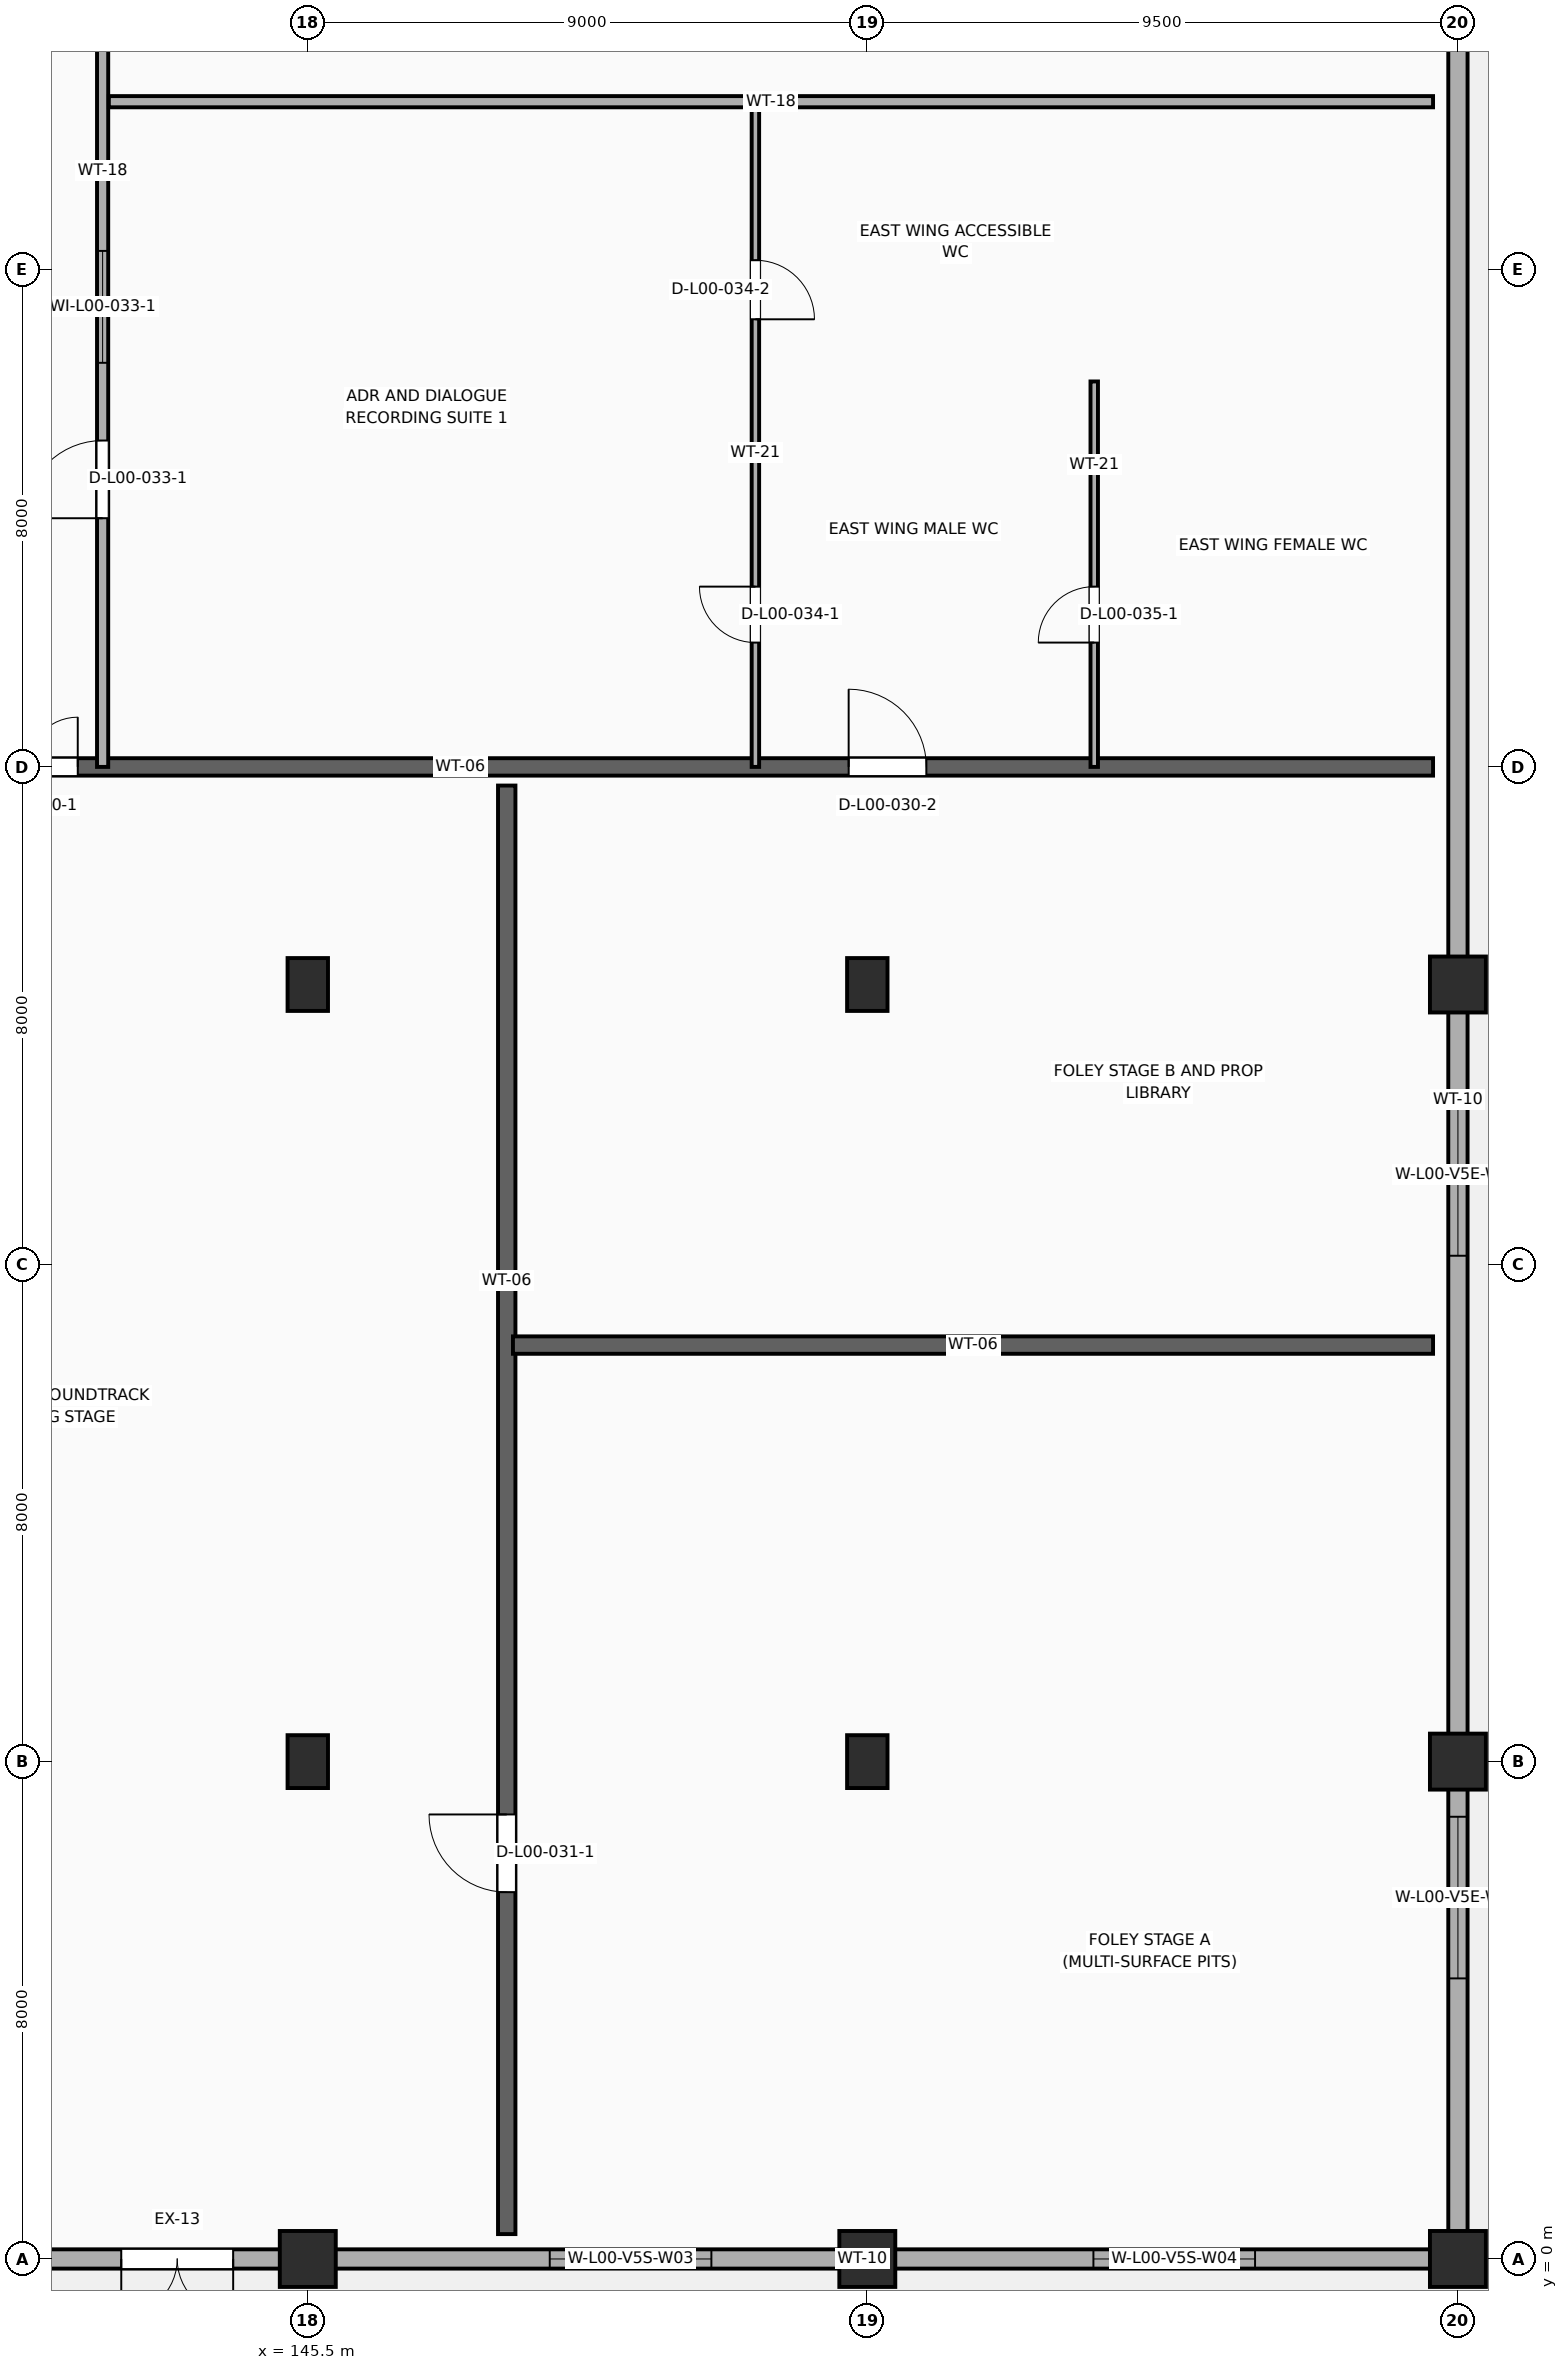
"""IFC4 building model, lengths in metres.
Left out: names, types, materials, properties, quantities, classifications, styles, units other than length and angle.
Written with IfcOpenShell. Run it as: python <this file> out.ifc"""

import sys

from ifc_helpers import new_model, si_unit, direction, frame, frame_2d, origin, origin_2d, place, context, subcontext, project, spatial, rectangle, extrude, element, fill, save


model = new_model("IFC4")
c1 = context("Model", 3, precision=1e-05, world=origin(), true_north=direction((0.0, 1.0)))
c2 = subcontext(c1, "Body", "Model", "MODEL_VIEW")
j1 = project(units=[si_unit("LENGTHUNIT", "METRE"), si_unit("PLANEANGLEUNIT", "RADIAN")], contexts=[c1])
p1 = place(None, origin())
s1 = spatial("IfcSite", under=j1, at=p1, CompositionType="ELEMENT")
p2 = place(p1, origin())
s2 = spatial("IfcBuilding", under=s1, at=p2, CompositionType="ELEMENT")
p3 = place(p2, origin())
s3 = spatial("IfcBuildingStorey", under=s2, at=p3, CompositionType="ELEMENT", Elevation=0.0)
p4 = place(p3, frame((145.5, 0.0, 0.0), z_axis=(0.0, 0.0, 1.0), x_axis=(1.0, 0.0, 0.0)))
e1 = element("IfcColumn", 1, at=p4, inside=s3, PredefinedType="COLUMN", context=c2, shape_type="SweptSolid", body=[
    extrude(rectangle(XDim=0.9, YDim=0.9, at=origin_2d()), origin(), (0.0, 0.0, 1.0), 5.14),
])
for number, where, z_axis, x_axis in (
    (2, (145.5, 8.0, 0.0), (0.0, 0.0, 1.0), (1.0, 0.0, 0.0)),
    (3, (145.5, 20.5, 0.0), (0.0, 0.0, 1.0), (1.0, 0.0, 0.0)),
):
    element("IfcColumn", number, at=place(p3, frame(where, z_axis=z_axis, x_axis=x_axis)), inside=s3, PredefinedType="COLUMN", context=c2, shape_type="SweptSolid", body=[
        extrude(rectangle(XDim=0.65, YDim=0.85, at=origin_2d()), origin(), (0.0, 0.0, 1.0), 5.14),
    ])
p5 = place(p3, frame((154.5, 0.0, 0.0), z_axis=(0.0, 0.0, 1.0), x_axis=(1.0, 0.0, 0.0)))
e4 = element("IfcColumn", 4, at=p5, inside=s3, PredefinedType="COLUMN", context=c2, shape_type="SweptSolid", body=[
    extrude(rectangle(XDim=0.9, YDim=0.9, at=origin_2d()), origin(), (0.0, 0.0, 1.0), 5.14),
])
for number, where, z_axis, x_axis in (
    (5, (154.5, 8.0, 0.0), (0.0, 0.0, 1.0), (1.0, 0.0, 0.0)),
    (6, (154.5, 20.5, 0.0), (0.0, 0.0, 1.0), (1.0, 0.0, 0.0)),
):
    element("IfcColumn", number, at=place(p3, frame(where, z_axis=z_axis, x_axis=x_axis)), inside=s3, PredefinedType="COLUMN", context=c2, shape_type="SweptSolid", body=[
        extrude(rectangle(XDim=0.65, YDim=0.85, at=origin_2d()), origin(), (0.0, 0.0, 1.0), 5.14),
    ])
for number, where, z_axis, x_axis in (
    (7, (164.0, 0.0, 0.0), (0.0, 0.0, 1.0), (1.0, 0.0, 0.0)),
    (8, (164.0, 8.0, 0.0), (0.0, 0.0, 1.0), (1.0, 0.0, 0.0)),
    (9, (164.0, 20.5, 0.0), (0.0, 0.0, 1.0), (1.0, 0.0, 0.0)),
):
    element("IfcColumn", number, at=place(p3, frame(where, z_axis=z_axis, x_axis=x_axis)), inside=s3, PredefinedType="COLUMN", context=c2, shape_type="SweptSolid", body=[
        extrude(rectangle(XDim=0.9, YDim=0.9, at=origin_2d()), origin(), (0.0, 0.0, 1.0), 5.14),
    ])
p6 = place(p3, frame((127.5, 0.0, 0.0), z_axis=(0.0, 0.0, 1.0), x_axis=(1.0, 0.0, 0.0)))
e10 = element("IfcWall", 10, at=p6, inside=s3, PredefinedType="STANDARD", context=c2, shape_type="SweptSolid", body=[
    extrude(rectangle(XDim=36.5, YDim=0.31, at=frame_2d((18.25, 0.0))), origin(), (0.0, 0.0, 1.0), 4.3),
])
p7 = place(p6, frame((15.0, 0.0, 0.0)))
e11 = element("IfcOpeningElement", 11, at=p7, cuts=e10, PredefinedType="OPENING", context=c2, shape_type="SweptSolid", body=[
    extrude(rectangle(XDim=1.8, YDim=2.3, at=frame_2d((0.9, 1.15))), frame((0.0, 0.167, 0.0), z_axis=(0.0, -1.0, 0.0), x_axis=(1.0, 0.0, 0.0)), (0.0, 0.0, 1.0), 0.334),
])
p8 = place(p6, frame((3.263, 0.0, 2.74)))
e12 = element("IfcOpeningElement", 12, at=p8, cuts=e10, PredefinedType="OPENING", context=c2, shape_type="SweptSolid", body=[
    extrude(rectangle(XDim=2.6, YDim=1.4, at=frame_2d((1.3, 0.7))), frame((0.0, 0.167, 0.0), z_axis=(0.0, -1.0, 0.0), x_axis=(1.0, 0.0, 0.0)), (0.0, 0.0, 1.0), 0.334),
])
p9 = place(p6, frame((21.892, 0.0, 2.74)))
e13 = element("IfcOpeningElement", 13, at=p9, cuts=e10, PredefinedType="OPENING", context=c2, shape_type="SweptSolid", body=[
    extrude(rectangle(XDim=2.6, YDim=1.4, at=frame_2d((1.3, 0.7))), frame((0.0, 0.167, 0.0), z_axis=(0.0, -1.0, 0.0), x_axis=(1.0, 0.0, 0.0)), (0.0, 0.0, 1.0), 0.334),
])
p10 = place(p6, frame((30.637, 0.0, 2.74)))
e14 = element("IfcOpeningElement", 14, at=p10, cuts=e10, PredefinedType="OPENING", context=c2, shape_type="SweptSolid", body=[
    extrude(rectangle(XDim=2.6, YDim=1.4, at=frame_2d((1.3, 0.7))), frame((0.0, 0.167, 0.0), z_axis=(0.0, -1.0, 0.0), x_axis=(1.0, 0.0, 0.0)), (0.0, 0.0, 1.0), 0.334),
])
p11 = place(p3, frame((164.0, 0.0, 0.0), z_axis=(0.0, 0.0, 1.0), x_axis=(0.0, 1.0, 0.0)))
e15 = element("IfcWall", 15, at=p11, inside=s3, PredefinedType="STANDARD", context=c2, shape_type="SweptSolid", body=[
    extrude(rectangle(XDim=46.5, YDim=0.31, at=frame_2d((23.25, 0.0))), origin(), (0.0, 0.0, 1.0), 4.3),
])
p12 = place(p11, frame((38.5, 0.0, 0.0)))
e16 = element("IfcOpeningElement", 16, at=p12, cuts=e15, PredefinedType="OPENING", context=c2, shape_type="SweptSolid", body=[
    extrude(rectangle(XDim=2.4, YDim=2.7, at=frame_2d((1.2, 1.35))), frame((0.0, 0.167, 0.0), z_axis=(0.0, -1.0, 0.0), x_axis=(1.0, 0.0, 0.0)), (0.0, 0.0, 1.0), 0.334),
])
p13 = place(p11, frame((4.513, 0.0, 2.74)))
e17 = element("IfcOpeningElement", 17, at=p13, cuts=e15, PredefinedType="OPENING", context=c2, shape_type="SweptSolid", body=[
    extrude(rectangle(XDim=2.6, YDim=1.4, at=frame_2d((1.3, 0.7))), frame((0.0, 0.167, 0.0), z_axis=(0.0, -1.0, 0.0), x_axis=(1.0, 0.0, 0.0)), (0.0, 0.0, 1.0), 0.334),
])
p14 = place(p11, frame((16.137, 0.0, 2.74)))
e18 = element("IfcOpeningElement", 18, at=p14, cuts=e15, PredefinedType="OPENING", context=c2, shape_type="SweptSolid", body=[
    extrude(rectangle(XDim=2.6, YDim=1.4, at=frame_2d((1.3, 0.7))), frame((0.0, 0.167, 0.0), z_axis=(0.0, -1.0, 0.0), x_axis=(1.0, 0.0, 0.0)), (0.0, 0.0, 1.0), 0.334),
])
p15 = place(p3, frame((136.7, 24.0, 0.0), z_axis=(0.0, 0.0, 1.0), x_axis=(1.0, 0.0, 0.0)))
e19 = element("IfcWall", 19, at=p15, inside=s3, PredefinedType="STANDARD", context=c2, shape_type="SweptSolid", body=[
    extrude(rectangle(XDim=26.9, YDim=0.28, at=frame_2d((13.45, 0.0))), origin(), (0.0, 0.0, 1.0), 5.1),
])
p16 = place(p15, frame((3.5, 0.0, 0.0)))
e20 = element("IfcOpeningElement", 20, at=p16, cuts=e19, PredefinedType="OPENING", context=c2, shape_type="SweptSolid", body=[
    extrude(rectangle(XDim=1.6, YDim=2.4, at=frame_2d((0.8, 1.2))), frame((0.0, 0.152, 0.0), z_axis=(0.0, -1.0, 0.0), x_axis=(1.0, 0.0, 0.0)), (0.0, 0.0, 1.0), 0.304),
])
p17 = place(p15, frame((17.5, 0.0, 0.0)))
e21 = element("IfcOpeningElement", 21, at=p17, cuts=e19, PredefinedType="OPENING", context=c2, shape_type="SweptSolid", body=[
    extrude(rectangle(XDim=1.25, YDim=2.25, at=frame_2d((0.625, 1.125))), frame((0.0, 0.152, 0.0), z_axis=(0.0, -1.0, 0.0), x_axis=(1.0, 0.0, 0.0)), (0.0, 0.0, 1.0), 0.304),
])
p18 = place(p3, frame((148.7, 0.4, 0.0), z_axis=(0.0, 0.0, 1.0), x_axis=(0.0, 1.0, 0.0)))
e22 = element("IfcWall", 22, at=p18, inside=s3, PredefinedType="STANDARD", context=c2, shape_type="SweptSolid", body=[
    extrude(rectangle(XDim=23.3, YDim=0.28, at=frame_2d((11.65, 0.0))), origin(), (0.0, 0.0, 1.0), 5.1),
])
p19 = place(p18, frame((5.5, 0.0, 0.0)))
e23 = element("IfcOpeningElement", 23, at=p19, cuts=e22, PredefinedType="OPENING", context=c2, shape_type="SweptSolid", body=[
    extrude(rectangle(XDim=1.25, YDim=2.25, at=frame_2d((0.625, 1.125))), frame((0.0, 0.152, 0.0), z_axis=(0.0, -1.0, 0.0), x_axis=(1.0, 0.0, 0.0)), (0.0, 0.0, 1.0), 0.304),
])
p20 = place(p3, frame((148.8, 14.7, 0.0), z_axis=(0.0, 0.0, 1.0), x_axis=(1.0, 0.0, 0.0)))
e24 = element("IfcWall", 24, at=p20, inside=s3, PredefinedType="STANDARD", context=c2, shape_type="SweptSolid", body=[
    extrude(rectangle(XDim=14.8, YDim=0.28, at=frame_2d((7.4, 0.0))), origin(), (0.0, 0.0, 1.0), 5.1),
])
p21 = place(p3, frame((142.2, 24.0, 0.0), z_axis=(0.0, 0.0, 1.0), x_axis=(0.0, 1.0, 0.0)))
e25 = element("IfcWall", 25, at=p21, inside=s3, PredefinedType="PARTITIONING", context=c2, shape_type="SweptSolid", body=[
    extrude(rectangle(XDim=22.2, YDim=0.18, at=frame_2d((11.1, 0.0))), origin(), (0.0, 0.0, 1.0), 4.748),
])
p22 = place(p21, frame((4.0, 0.0, 0.0)))
e26 = element("IfcOpeningElement", 26, at=p22, cuts=e25, PredefinedType="OPENING", context=c2, shape_type="SweptSolid", body=[
    extrude(rectangle(XDim=1.25, YDim=2.25, at=frame_2d((0.625, 1.125))), frame((0.0, 0.102, 0.0), z_axis=(0.0, -1.0, 0.0), x_axis=(1.0, 0.0, 0.0)), (0.0, 0.0, 1.0), 0.204),
])
p23 = place(p21, frame((15.0, 0.0, 0.0)))
e27 = element("IfcOpeningElement", 27, at=p23, cuts=e25, PredefinedType="OPENING", context=c2, shape_type="SweptSolid", body=[
    extrude(rectangle(XDim=1.4, YDim=2.3, at=frame_2d((0.7, 1.15))), frame((0.0, 0.102, 0.0), z_axis=(0.0, -1.0, 0.0), x_axis=(1.0, 0.0, 0.0)), (0.0, 0.0, 1.0), 0.204),
])
p24 = place(p21, frame((6.5, 0.0, 1.1)))
e28 = element("IfcOpeningElement", 28, at=p24, cuts=e25, PredefinedType="OPENING", context=c2, shape_type="SweptSolid", body=[
    extrude(rectangle(XDim=1.8, YDim=1.1, at=frame_2d((0.9, 0.55))), frame((0.0, 0.102, 0.0), z_axis=(0.0, -1.0, 0.0), x_axis=(1.0, 0.0, 0.0)), (0.0, 0.0, 1.0), 0.204),
])
p25 = place(p3, frame((152.7, 24.0, 0.0), z_axis=(0.0, 0.0, 1.0), x_axis=(0.0, 1.0, 0.0)))
e29 = element("IfcWall", 29, at=p25, inside=s3, PredefinedType="PARTITIONING", context=c2, shape_type="SweptSolid", body=[
    extrude(rectangle(XDim=10.7, YDim=0.12, at=frame_2d((5.35, 0.0))), origin(), (0.0, 0.0, 1.0), 4.752),
])
p26 = place(p25, frame((2.0, 0.0, 0.0)))
e30 = element("IfcOpeningElement", 30, at=p26, cuts=e29, PredefinedType="OPENING", context=c2, shape_type="SweptSolid", body=[
    extrude(rectangle(XDim=0.9, YDim=2.15, at=frame_2d((0.45, 1.075))), frame((0.0, 0.072, 0.0), z_axis=(0.0, -1.0, 0.0), x_axis=(1.0, 0.0, 0.0)), (0.0, 0.0, 1.0), 0.144),
])
p27 = place(p25, frame((7.2, 0.0, 0.0)))
e31 = element("IfcOpeningElement", 31, at=p27, cuts=e29, PredefinedType="OPENING", context=c2, shape_type="SweptSolid", body=[
    extrude(rectangle(XDim=0.95, YDim=2.15, at=frame_2d((0.475, 1.075))), frame((0.0, 0.072, 0.0), z_axis=(0.0, -1.0, 0.0), x_axis=(1.0, 0.0, 0.0)), (0.0, 0.0, 1.0), 0.144),
])
p28 = place(p3, frame((158.15, 24.0, 0.0), z_axis=(0.0, 0.0, 1.0), x_axis=(0.0, 1.0, 0.0)))
e32 = element("IfcWall", 32, at=p28, inside=s3, PredefinedType="PARTITIONING", context=c2, shape_type="SweptSolid", body=[
    extrude(rectangle(XDim=6.2, YDim=0.12, at=frame_2d((3.1, 0.0))), origin(), (0.0, 0.0, 1.0), 4.802),
])
p29 = place(p28, frame((2.0, 0.0, 0.0)))
e33 = element("IfcOpeningElement", 33, at=p29, cuts=e32, PredefinedType="OPENING", context=c2, shape_type="SweptSolid", body=[
    extrude(rectangle(XDim=0.9, YDim=2.15, at=frame_2d((0.45, 1.075))), frame((0.0, 0.072, 0.0), z_axis=(0.0, -1.0, 0.0), x_axis=(1.0, 0.0, 0.0)), (0.0, 0.0, 1.0), 0.144),
])
p30 = place(p3, frame((142.3, 34.7, 0.0), z_axis=(0.0, 0.0, 1.0), x_axis=(1.0, 0.0, 0.0)))
e34 = element("IfcWall", 34, at=p30, inside=s3, PredefinedType="PARTITIONING", context=c2, shape_type="SweptSolid", body=[
    extrude(rectangle(XDim=21.3, YDim=0.18, at=frame_2d((10.65, 0.0))), origin(), (0.0, 0.0, 1.0), 4.25),
])
p31 = place(p7, frame((1.8, 0.0, 0.0), z_axis=(0.0, 0.0, 1.0), x_axis=(-1.0, 0.0, 0.0)))
e35 = element("IfcDoor", 35, at=p31, inside=s3, OperationType="DOUBLE_DOOR_SINGLE_SWING", PredefinedType="DOOR", context=c2, shape_type="SweptSolid", body=[
    extrude(rectangle(XDim=1.8, YDim=2.3, at=frame_2d((0.9, 1.15))), frame((0.0, 0.025, 0.0), z_axis=(0.0, -1.0, 0.0), x_axis=(1.0, 0.0, 0.0)), (0.0, 0.0, 1.0), 0.05),
])
fill(e11, e35)
p32 = place(p9, origin())
e36 = element("IfcWindow", 36, at=p32, inside=s3, PartitioningType="SINGLE_PANEL", PredefinedType="WINDOW", context=c2, shape_type="SweptSolid", body=[
    extrude(rectangle(XDim=2.6, YDim=1.4, at=frame_2d((1.3, 0.7))), frame((0.0, 0.03, 0.0), z_axis=(0.0, -1.0, 0.0), x_axis=(1.0, 0.0, 0.0)), (0.0, 0.0, 1.0), 0.06),
])
fill(e13, e36)
p33 = place(p10, origin())
e37 = element("IfcWindow", 37, at=p33, inside=s3, PartitioningType="SINGLE_PANEL", PredefinedType="WINDOW", context=c2, shape_type="SweptSolid", body=[
    extrude(rectangle(XDim=2.6, YDim=1.4, at=frame_2d((1.3, 0.7))), frame((0.0, 0.03, 0.0), z_axis=(0.0, -1.0, 0.0), x_axis=(1.0, 0.0, 0.0)), (0.0, 0.0, 1.0), 0.06),
])
fill(e14, e37)
p34 = place(p13, origin())
e38 = element("IfcWindow", 38, at=p34, inside=s3, PartitioningType="SINGLE_PANEL", PredefinedType="WINDOW", context=c2, shape_type="SweptSolid", body=[
    extrude(rectangle(XDim=2.6, YDim=1.4, at=frame_2d((1.3, 0.7))), frame((0.0, 0.03, 0.0), z_axis=(0.0, -1.0, 0.0), x_axis=(1.0, 0.0, 0.0)), (0.0, 0.0, 1.0), 0.06),
])
fill(e17, e38)
p35 = place(p14, origin())
e39 = element("IfcWindow", 39, at=p35, inside=s3, PartitioningType="SINGLE_PANEL", PredefinedType="WINDOW", context=c2, shape_type="SweptSolid", body=[
    extrude(rectangle(XDim=2.6, YDim=1.4, at=frame_2d((1.3, 0.7))), frame((0.0, 0.03, 0.0), z_axis=(0.0, -1.0, 0.0), x_axis=(1.0, 0.0, 0.0)), (0.0, 0.0, 1.0), 0.06),
])
fill(e18, e39)
p36 = place(p16, origin())
e40 = element("IfcDoor", 40, at=p36, inside=s3, OperationType="DOUBLE_DOOR_SINGLE_SWING", PredefinedType="DOOR", context=c2, shape_type="SweptSolid", body=[
    extrude(rectangle(XDim=1.6, YDim=2.4, at=frame_2d((0.8, 1.2))), frame((0.0, 0.025, 0.0), z_axis=(0.0, -1.0, 0.0), x_axis=(1.0, 0.0, 0.0)), (0.0, 0.0, 1.0), 0.05),
])
fill(e20, e40)
p37 = place(p17, origin())
e41 = element("IfcDoor", 41, at=p37, inside=s3, OperationType="SINGLE_SWING_LEFT", PredefinedType="DOOR", context=c2, shape_type="SweptSolid", body=[
    extrude(rectangle(XDim=1.25, YDim=2.25, at=frame_2d((0.625, 1.125))), frame((0.0, 0.025, 0.0), z_axis=(0.0, -1.0, 0.0), x_axis=(1.0, 0.0, 0.0)), (0.0, 0.0, 1.0), 0.05),
])
fill(e21, e41)
p38 = place(p19, origin())
e42 = element("IfcDoor", 42, at=p38, inside=s3, OperationType="SINGLE_SWING_RIGHT", PredefinedType="DOOR", context=c2, shape_type="SweptSolid", body=[
    extrude(rectangle(XDim=1.25, YDim=2.25, at=frame_2d((0.625, 1.125))), frame((0.0, 0.025, 0.0), z_axis=(0.0, -1.0, 0.0), x_axis=(1.0, 0.0, 0.0)), (0.0, 0.0, 1.0), 0.05),
])
fill(e23, e42)
p39 = place(p22, origin())
e43 = element("IfcDoor", 43, at=p39, inside=s3, OperationType="SINGLE_SWING_LEFT", PredefinedType="DOOR", context=c2, shape_type="SweptSolid", body=[
    extrude(rectangle(XDim=1.25, YDim=2.25, at=frame_2d((0.625, 1.125))), frame((0.0, 0.025, 0.0), z_axis=(0.0, -1.0, 0.0), x_axis=(1.0, 0.0, 0.0)), (0.0, 0.0, 1.0), 0.05),
])
fill(e26, e43)
p40 = place(p24, origin())
e44 = element("IfcWindow", 44, at=p40, inside=s3, PartitioningType="SINGLE_PANEL", PredefinedType="WINDOW", context=c2, shape_type="SweptSolid", body=[
    extrude(rectangle(XDim=1.8, YDim=1.1, at=frame_2d((0.9, 0.55))), frame((0.0, 0.03, 0.0), z_axis=(0.0, -1.0, 0.0), x_axis=(1.0, 0.0, 0.0)), (0.0, 0.0, 1.0), 0.06),
])
fill(e28, e44)
p41 = place(p26, origin())
e45 = element("IfcDoor", 45, at=p41, inside=s3, OperationType="SINGLE_SWING_RIGHT", PredefinedType="DOOR", context=c2, shape_type="SweptSolid", body=[
    extrude(rectangle(XDim=0.9, YDim=2.15, at=frame_2d((0.45, 1.075))), frame((0.0, 0.025, 0.0), z_axis=(0.0, -1.0, 0.0), x_axis=(1.0, 0.0, 0.0)), (0.0, 0.0, 1.0), 0.05),
])
fill(e30, e45)
p42 = place(p27, frame((0.95, 0.0, 0.0), z_axis=(0.0, 0.0, 1.0), x_axis=(-1.0, 0.0, 0.0)))
e46 = element("IfcDoor", 46, at=p42, inside=s3, OperationType="SINGLE_SWING_LEFT", PredefinedType="DOOR", context=c2, shape_type="SweptSolid", body=[
    extrude(rectangle(XDim=0.95, YDim=2.15, at=frame_2d((0.475, 1.075))), frame((0.0, 0.025, 0.0), z_axis=(0.0, -1.0, 0.0), x_axis=(1.0, 0.0, 0.0)), (0.0, 0.0, 1.0), 0.05),
])
fill(e31, e46)
p43 = place(p29, origin())
e47 = element("IfcDoor", 47, at=p43, inside=s3, OperationType="SINGLE_SWING_LEFT", PredefinedType="DOOR", context=c2, shape_type="SweptSolid", body=[
    extrude(rectangle(XDim=0.9, YDim=2.15, at=frame_2d((0.45, 1.075))), frame((0.0, 0.025, 0.0), z_axis=(0.0, -1.0, 0.0), x_axis=(1.0, 0.0, 0.0)), (0.0, 0.0, 1.0), 0.05),
])
fill(e33, e47)
save(model, sys.argv[1])
